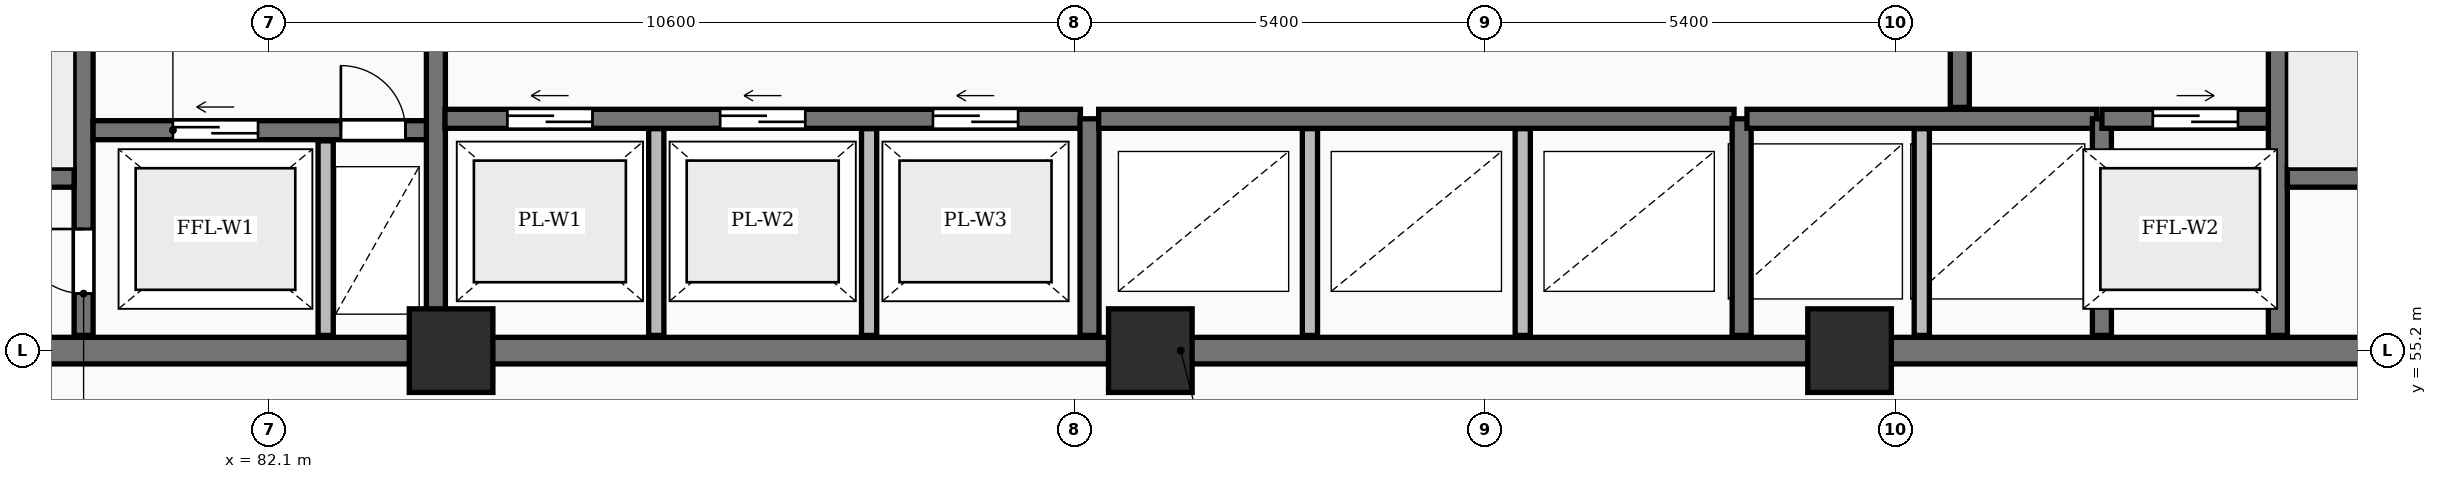
"""IFC4 building model, lengths in metres.
Left out: names, types, materials, properties, quantities, classifications, styles, units other than length and angle.
Written with IfcOpenShell. Run it as: python <this file> out.ifc"""

import sys

from ifc_helpers import new_model, si_unit, direction, frame, frame_2d, origin, origin_2d, place, context, subcontext, project, spatial, rectangle, extrude, element, fill, save


model = new_model("IFC4")
c1 = context("Model", 3, precision=1e-05, world=origin(), true_north=direction((0.0, 1.0)))
c2 = subcontext(c1, "Body", "Model", "MODEL_VIEW")
j1 = project(units=[si_unit("LENGTHUNIT", "METRE"), si_unit("PLANEANGLEUNIT", "RADIAN")], contexts=[c1])
p1 = place(None, origin())
s1 = spatial("IfcSite", under=j1, at=p1, CompositionType="ELEMENT")
p2 = place(p1, origin())
s2 = spatial("IfcBuilding", under=s1, at=p2, CompositionType="ELEMENT")
p3 = place(p2, frame((0.0, 0.0, 10.0)))
s3 = spatial("IfcBuildingStorey", under=s2, at=p3, CompositionType="ELEMENT", Elevation=10.0)
for number, where, z_axis, x_axis in (
    (1, (84.5, 55.2, 0.0), (0.0, 0.0, 1.0), (1.0, 0.0, 0.0)),
    (2, (93.7, 55.2, 0.0), (0.0, 0.0, 1.0), (1.0, 0.0, 0.0)),
    (3, (102.9, 55.2, 0.0), (0.0, 0.0, 1.0), (1.0, 0.0, 0.0)),
):
    element("IfcColumn", number, at=place(p3, frame(where, z_axis=z_axis, x_axis=x_axis)), inside=s3, PredefinedType="COLUMN", context=c2, shape_type="SweptSolid", body=[
        extrude(rectangle(XDim=1.1, YDim=1.1, at=origin_2d()), origin(), (0.0, 0.0, 1.0), 4.5),
    ])
p4 = place(p3, frame((75.95, 55.2, 0.0), z_axis=(0.0, 0.0, 1.0), x_axis=(1.0, 0.0, 0.0)))
e4 = element("IfcWall", 4, at=p4, inside=s3, PredefinedType="SHEAR", context=c2, shape_type="SweptSolid", body=[
    extrude(rectangle(XDim=36.3, YDim=0.35, at=frame_2d((18.15, 0.0))), origin(), (0.0, 0.0, 1.0), 4.5),
])
p5 = place(p3, frame((79.665, 55.4, 0.0), z_axis=(0.0, 0.0, 1.0), x_axis=(0.0, 1.0, 0.0)))
e5 = element("IfcWall", 5, at=p5, inside=s3, PredefinedType="SHEAR", context=c2, shape_type="SweptSolid", body=[
    extrude(rectangle(XDim=11.6, YDim=0.25, at=frame_2d((5.8, 0.0))), origin(), (0.0, 0.0, 1.0), 4.5),
])
p6 = place(p5, frame((0.55, 0.0, 0.0)))
e6 = element("IfcOpeningElement", 6, at=p6, cuts=e5, PredefinedType="OPENING", context=c2, shape_type="SweptSolid", body=[
    extrude(rectangle(XDim=0.85, YDim=2.05, at=frame_2d((0.425, 1.025))), frame((0.0, 0.135, 0.0), z_axis=(0.0, -1.0, 0.0), x_axis=(1.0, 0.0, 0.0)), (0.0, 0.0, 1.0), 0.27),
])
p7 = place(p5, frame((8.4, 0.0, 0.0)))
e7 = element("IfcOpeningElement", 7, at=p7, cuts=e5, PredefinedType="OPENING", context=c2, shape_type="SweptSolid", body=[
    extrude(rectangle(XDim=1.1, YDim=2.1, at=frame_2d((0.55, 1.05))), frame((0.0, 0.135, 0.0), z_axis=(0.0, -1.0, 0.0), x_axis=(1.0, 0.0, 0.0)), (0.0, 0.0, 1.0), 0.27),
])
p8 = place(p5, frame((10.25, 0.0, 0.0)))
e8 = element("IfcOpeningElement", 8, at=p8, cuts=e5, PredefinedType="OPENING", context=c2, shape_type="SweptSolid", body=[
    extrude(rectangle(XDim=0.85, YDim=2.05, at=frame_2d((0.425, 1.025))), frame((0.0, 0.135, 0.0), z_axis=(0.0, -1.0, 0.0), x_axis=(1.0, 0.0, 0.0)), (0.0, 0.0, 1.0), 0.27),
])
p9 = place(p3, frame((76.3, 57.475, 0.0), z_axis=(0.0, 0.0, 1.0), x_axis=(1.0, 0.0, 0.0)))
e9 = element("IfcWall", 9, at=p9, inside=s3, PredefinedType="SHEAR", context=c2, shape_type="SweptSolid", body=[
    extrude(rectangle(XDim=3.24, YDim=0.25, at=frame_2d((1.62, 0.0))), origin(), (0.0, 0.0, 1.0), 4.5),
])
p10 = place(p3, frame((79.79, 58.1, 0.0), z_axis=(0.0, 0.0, 1.0), x_axis=(1.0, 0.0, 0.0)))
e10 = element("IfcWall", 10, at=p10, inside=s3, PredefinedType="SHEAR", context=c2, shape_type="SweptSolid", body=[
    extrude(rectangle(XDim=4.39, YDim=0.25, at=frame_2d((2.195, 0.0))), origin(), (0.0, 0.0, 1.0), 4.5),
])
p11 = place(p10, frame((1.05, 0.0, 0.0)))
e11 = element("IfcOpeningElement", 11, at=p11, cuts=e10, PredefinedType="OPENING", context=c2, shape_type="SweptSolid", body=[
    extrude(rectangle(XDim=1.12, YDim=2.12, at=frame_2d((0.56, 1.06))), frame((0.0, 0.135, 0.0), z_axis=(0.0, -1.0, 0.0), x_axis=(1.0, 0.0, 0.0)), (0.0, 0.0, 1.0), 0.27),
])
p12 = place(p10, frame((3.26, 0.0, 0.0)))
e12 = element("IfcOpeningElement", 12, at=p12, cuts=e10, PredefinedType="OPENING", context=c2, shape_type="SweptSolid", body=[
    extrude(rectangle(XDim=0.85, YDim=2.05, at=frame_2d((0.425, 1.025))), frame((0.0, 0.135, 0.0), z_axis=(0.0, -1.0, 0.0), x_axis=(1.0, 0.0, 0.0)), (0.0, 0.0, 1.0), 0.27),
])
p13 = place(p3, frame((82.85, 55.4, 0.0), z_axis=(0.0, 0.0, 1.0), x_axis=(0.0, 1.0, 0.0)))
e13 = element("IfcWall", 13, at=p13, inside=s3, PredefinedType="PARTITIONING", context=c2, shape_type="SweptSolid", body=[
    extrude(rectangle(XDim=2.56, YDim=0.2, at=frame_2d((1.28, 0.0))), origin(), (0.0, 0.0, 1.0), 4.2),
])
p14 = place(p3, frame((84.3, 55.4, 0.0), z_axis=(0.0, 0.0, 1.0), x_axis=(0.0, 1.0, 0.0)))
e14 = element("IfcWall", 14, at=p14, inside=s3, PredefinedType="SHEAR", context=c2, shape_type="SweptSolid", body=[
    extrude(rectangle(XDim=11.6, YDim=0.25, at=frame_2d((5.8, 0.0))), origin(), (0.0, 0.0, 1.0), 4.5),
])
p15 = place(p14, frame((5.2, 0.0, 0.0)))
e15 = element("IfcOpeningElement", 15, at=p15, cuts=e14, PredefinedType="OPENING", context=c2, shape_type="SweptSolid", body=[
    extrude(rectangle(XDim=1.1, YDim=2.1, at=frame_2d((0.55, 1.05))), frame((0.0, 0.135, 0.0), z_axis=(0.0, -1.0, 0.0), x_axis=(1.0, 0.0, 0.0)), (0.0, 0.0, 1.0), 0.27),
])
for number, where, z_axis, x_axis in (
    (16, (87.2, 55.4, 0.0), (0.0, 0.0, 1.0), (0.0, 1.0, 0.0)),
    (17, (90.0, 55.4, 0.0), (0.0, 0.0, 1.0), (0.0, 1.0, 0.0)),
):
    element("IfcWall", number, at=place(p3, frame(where, z_axis=z_axis, x_axis=x_axis)), inside=s3, PredefinedType="PARTITIONING", context=c2, shape_type="SweptSolid", body=[
        extrude(rectangle(XDim=2.72, YDim=0.2, at=frame_2d((1.36, 0.0))), origin(), (0.0, 0.0, 1.0), 4.2),
    ])
p16 = place(p3, frame((84.42, 58.25, 0.0), z_axis=(0.0, 0.0, 1.0), x_axis=(1.0, 0.0, 0.0)))
e18 = element("IfcWall", 18, at=p16, inside=s3, PredefinedType="SHEAR", context=c2, shape_type="SweptSolid", body=[
    extrude(rectangle(XDim=8.36, YDim=0.25, at=frame_2d((4.18, 0.0))), origin(), (0.0, 0.0, 1.0), 4.5),
])
p17 = place(p16, frame((0.82, 0.0, 0.0)))
e19 = element("IfcOpeningElement", 19, at=p17, cuts=e18, PredefinedType="OPENING", context=c2, shape_type="SweptSolid", body=[
    extrude(rectangle(XDim=1.12, YDim=2.12, at=frame_2d((0.56, 1.06))), frame((0.0, 0.135, 0.0), z_axis=(0.0, -1.0, 0.0), x_axis=(1.0, 0.0, 0.0)), (0.0, 0.0, 1.0), 0.27),
])
p18 = place(p16, frame((3.62, 0.0, 0.0)))
e20 = element("IfcOpeningElement", 20, at=p18, cuts=e18, PredefinedType="OPENING", context=c2, shape_type="SweptSolid", body=[
    extrude(rectangle(XDim=1.12, YDim=2.12, at=frame_2d((0.56, 1.06))), frame((0.0, 0.135, 0.0), z_axis=(0.0, -1.0, 0.0), x_axis=(1.0, 0.0, 0.0)), (0.0, 0.0, 1.0), 0.27),
])
p19 = place(p16, frame((6.42, 0.0, 0.0)))
e21 = element("IfcOpeningElement", 21, at=p19, cuts=e18, PredefinedType="OPENING", context=c2, shape_type="SweptSolid", body=[
    extrude(rectangle(XDim=1.12, YDim=2.12, at=frame_2d((0.56, 1.06))), frame((0.0, 0.135, 0.0), z_axis=(0.0, -1.0, 0.0), x_axis=(1.0, 0.0, 0.0)), (0.0, 0.0, 1.0), 0.27),
])
p20 = place(p3, frame((92.9, 55.4, 0.0), z_axis=(0.0, 0.0, 1.0), x_axis=(0.0, 1.0, 0.0)))
e22 = element("IfcWall", 22, at=p20, inside=s3, PredefinedType="SHEAR", context=c2, shape_type="SweptSolid", body=[
    extrude(rectangle(XDim=2.85, YDim=0.25, at=frame_2d((1.425, 0.0))), origin(), (0.0, 0.0, 1.0), 4.5),
])
for number, where, z_axis, x_axis in (
    (23, (95.8, 55.4, 0.0), (0.0, 0.0, 1.0), (0.0, 1.0, 0.0)),
    (24, (98.6, 55.4, 0.0), (0.0, 0.0, 1.0), (0.0, 1.0, 0.0)),
):
    element("IfcWall", number, at=place(p3, frame(where, z_axis=z_axis, x_axis=x_axis)), inside=s3, PredefinedType="PARTITIONING", context=c2, shape_type="SweptSolid", body=[
        extrude(rectangle(XDim=2.72, YDim=0.2, at=frame_2d((1.36, 0.0))), origin(), (0.0, 0.0, 1.0), 4.2),
    ])
p21 = place(p3, frame((93.02, 58.25, 0.0), z_axis=(0.0, 0.0, 1.0), x_axis=(1.0, 0.0, 0.0)))
e25 = element("IfcWall", 25, at=p21, inside=s3, PredefinedType="SHEAR", context=c2, shape_type="SweptSolid", body=[
    extrude(rectangle(XDim=8.36, YDim=0.25, at=frame_2d((4.18, 0.0))), origin(), (0.0, 0.0, 1.0), 4.5),
])
p22 = place(p3, frame((101.48, 55.4, 0.0), z_axis=(0.0, 0.0, 1.0), x_axis=(0.0, 1.0, 0.0)))
e26 = element("IfcWall", 26, at=p22, inside=s3, PredefinedType="SHEAR", context=c2, shape_type="SweptSolid", body=[
    extrude(rectangle(XDim=2.85, YDim=0.25, at=frame_2d((1.425, 0.0))), origin(), (0.0, 0.0, 1.0), 4.5),
])
p23 = place(p3, frame((103.85, 55.4, 0.0), z_axis=(0.0, 0.0, 1.0), x_axis=(0.0, 1.0, 0.0)))
e27 = element("IfcWall", 27, at=p23, inside=s3, PredefinedType="PARTITIONING", context=c2, shape_type="SweptSolid", body=[
    extrude(rectangle(XDim=2.72, YDim=0.2, at=frame_2d((1.36, 0.0))), origin(), (0.0, 0.0, 1.0), 4.2),
])
p24 = place(p3, frame((101.55, 58.25, 0.0), z_axis=(0.0, 0.0, 1.0), x_axis=(1.0, 0.0, 0.0)))
e28 = element("IfcWall", 28, at=p24, inside=s3, PredefinedType="SHEAR", context=c2, shape_type="SweptSolid", body=[
    extrude(rectangle(XDim=4.6, YDim=0.25, at=frame_2d((2.3, 0.0))), origin(), (0.0, 0.0, 1.0), 4.5),
])
p25 = place(p3, frame((106.22, 55.4, 0.0), z_axis=(0.0, 0.0, 1.0), x_axis=(0.0, 1.0, 0.0)))
e29 = element("IfcWall", 29, at=p25, inside=s3, PredefinedType="SHEAR", context=c2, shape_type="SweptSolid", body=[
    extrude(rectangle(XDim=2.85, YDim=0.25, at=frame_2d((1.425, 0.0))), origin(), (0.0, 0.0, 1.0), 4.5),
])
p26 = place(p3, frame((106.22, 58.25, 0.0), z_axis=(0.0, 0.0, 1.0), x_axis=(1.0, 0.0, 0.0)))
e30 = element("IfcWall", 30, at=p26, inside=s3, PredefinedType="SHEAR", context=c2, shape_type="SweptSolid", body=[
    extrude(rectangle(XDim=2.46, YDim=0.25, at=frame_2d((1.23, 0.0))), origin(), (0.0, 0.0, 1.0), 4.5),
])
p27 = place(p26, frame((0.67, 0.0, 0.0)))
e31 = element("IfcOpeningElement", 31, at=p27, cuts=e30, PredefinedType="OPENING", context=c2, shape_type="SweptSolid", body=[
    extrude(rectangle(XDim=1.12, YDim=2.12, at=frame_2d((0.56, 1.06))), frame((0.0, 0.135, 0.0), z_axis=(0.0, -1.0, 0.0), x_axis=(1.0, 0.0, 0.0)), (0.0, 0.0, 1.0), 0.27),
])
p28 = place(p3, frame((104.35, 58.4, 0.0), z_axis=(0.0, 0.0, 1.0), x_axis=(0.0, 1.0, 0.0)))
e32 = element("IfcWall", 32, at=p28, inside=s3, PredefinedType="SHEAR", context=c2, shape_type="SweptSolid", body=[
    extrude(rectangle(XDim=8.6, YDim=0.25, at=frame_2d((4.3, 0.0))), origin(), (0.0, 0.0, 1.0), 4.5),
])
p29 = place(p28, frame((1.8, 0.0, 0.0)))
e33 = element("IfcOpeningElement", 33, at=p29, cuts=e32, PredefinedType="OPENING", context=c2, shape_type="SweptSolid", body=[
    extrude(rectangle(XDim=1.1, YDim=2.1, at=frame_2d((0.55, 1.05))), frame((0.0, 0.135, 0.0), z_axis=(0.0, -1.0, 0.0), x_axis=(1.0, 0.0, 0.0)), (0.0, 0.0, 1.0), 0.27),
])
p30 = place(p3, frame((108.535, 55.4, 0.0), z_axis=(0.0, 0.0, 1.0), x_axis=(0.0, 1.0, 0.0)))
e34 = element("IfcWall", 34, at=p30, inside=s3, PredefinedType="SHEAR", context=c2, shape_type="SweptSolid", body=[
    extrude(rectangle(XDim=11.6, YDim=0.25, at=frame_2d((5.8, 0.0))), origin(), (0.0, 0.0, 1.0), 4.5),
])
p31 = place(p30, frame((8.2, 0.0, 0.0)))
e35 = element("IfcOpeningElement", 35, at=p31, cuts=e34, PredefinedType="OPENING", context=c2, shape_type="SweptSolid", body=[
    extrude(rectangle(XDim=1.1, YDim=2.1, at=frame_2d((0.55, 1.05))), frame((0.0, 0.135, 0.0), z_axis=(0.0, -1.0, 0.0), x_axis=(1.0, 0.0, 0.0)), (0.0, 0.0, 1.0), 0.27),
])
p32 = place(p30, frame((10.25, 0.0, 0.0)))
e36 = element("IfcOpeningElement", 36, at=p32, cuts=e34, PredefinedType="OPENING", context=c2, shape_type="SweptSolid", body=[
    extrude(rectangle(XDim=0.85, YDim=2.05, at=frame_2d((0.425, 1.025))), frame((0.0, 0.135, 0.0), z_axis=(0.0, -1.0, 0.0), x_axis=(1.0, 0.0, 0.0)), (0.0, 0.0, 1.0), 0.27),
])
p33 = place(p3, frame((108.66, 57.475, 0.0), z_axis=(0.0, 0.0, 1.0), x_axis=(1.0, 0.0, 0.0)))
e37 = element("IfcWall", 37, at=p33, inside=s3, PredefinedType="SHEAR", context=c2, shape_type="SweptSolid", body=[
    extrude(rectangle(XDim=3.24, YDim=0.25, at=frame_2d((1.62, 0.0))), origin(), (0.0, 0.0, 1.0), 4.5),
])
p34 = place(p6, origin())
e38 = element("IfcDoor", 38, at=p34, inside=s3, OperationType="SINGLE_SWING_RIGHT", PredefinedType="DOOR", context=c2, shape_type="SweptSolid", body=[
    extrude(rectangle(XDim=0.85, YDim=2.05, at=frame_2d((0.425, 1.025))), frame((0.0, 0.025, 0.0), z_axis=(0.0, -1.0, 0.0), x_axis=(1.0, 0.0, 0.0)), (0.0, 0.0, 1.0), 0.05),
])
fill(e6, e38)
p35 = place(p11, origin())
e39 = element("IfcDoor", 39, at=p35, inside=s3, OperationType="SLIDING_TO_LEFT", PredefinedType="DOOR", context=c2, shape_type="SweptSolid", body=[
    extrude(rectangle(XDim=1.12, YDim=2.12, at=frame_2d((0.56, 1.06))), frame((0.0, 0.025, 0.0), z_axis=(0.0, -1.0, 0.0), x_axis=(1.0, 0.0, 0.0)), (0.0, 0.0, 1.0), 0.05),
])
fill(e11, e39)
p36 = place(p12, origin())
e40 = element("IfcDoor", 40, at=p36, inside=s3, OperationType="SINGLE_SWING_LEFT", PredefinedType="DOOR", context=c2, shape_type="SweptSolid", body=[
    extrude(rectangle(XDim=0.85, YDim=2.05, at=frame_2d((0.425, 1.025))), frame((0.0, 0.025, 0.0), z_axis=(0.0, -1.0, 0.0), x_axis=(1.0, 0.0, 0.0)), (0.0, 0.0, 1.0), 0.05),
])
fill(e12, e40)
p37 = place(p17, origin())
e41 = element("IfcDoor", 41, at=p37, inside=s3, OperationType="SLIDING_TO_LEFT", PredefinedType="DOOR", context=c2, shape_type="SweptSolid", body=[
    extrude(rectangle(XDim=1.12, YDim=2.12, at=frame_2d((0.56, 1.06))), frame((0.0, 0.025, 0.0), z_axis=(0.0, -1.0, 0.0), x_axis=(1.0, 0.0, 0.0)), (0.0, 0.0, 1.0), 0.05),
])
fill(e19, e41)
p38 = place(p18, origin())
e42 = element("IfcDoor", 42, at=p38, inside=s3, OperationType="SLIDING_TO_LEFT", PredefinedType="DOOR", context=c2, shape_type="SweptSolid", body=[
    extrude(rectangle(XDim=1.12, YDim=2.12, at=frame_2d((0.56, 1.06))), frame((0.0, 0.025, 0.0), z_axis=(0.0, -1.0, 0.0), x_axis=(1.0, 0.0, 0.0)), (0.0, 0.0, 1.0), 0.05),
])
fill(e20, e42)
p39 = place(p19, origin())
e43 = element("IfcDoor", 43, at=p39, inside=s3, OperationType="SLIDING_TO_LEFT", PredefinedType="DOOR", context=c2, shape_type="SweptSolid", body=[
    extrude(rectangle(XDim=1.12, YDim=2.12, at=frame_2d((0.56, 1.06))), frame((0.0, 0.025, 0.0), z_axis=(0.0, -1.0, 0.0), x_axis=(1.0, 0.0, 0.0)), (0.0, 0.0, 1.0), 0.05),
])
fill(e21, e43)
p40 = place(p27, origin())
e44 = element("IfcDoor", 44, at=p40, inside=s3, OperationType="SLIDING_TO_RIGHT", PredefinedType="DOOR", context=c2, shape_type="SweptSolid", body=[
    extrude(rectangle(XDim=1.12, YDim=2.12, at=frame_2d((0.56, 1.06))), frame((0.0, 0.025, 0.0), z_axis=(0.0, -1.0, 0.0), x_axis=(1.0, 0.0, 0.0)), (0.0, 0.0, 1.0), 0.05),
])
fill(e31, e44)
save(model, sys.argv[1])
